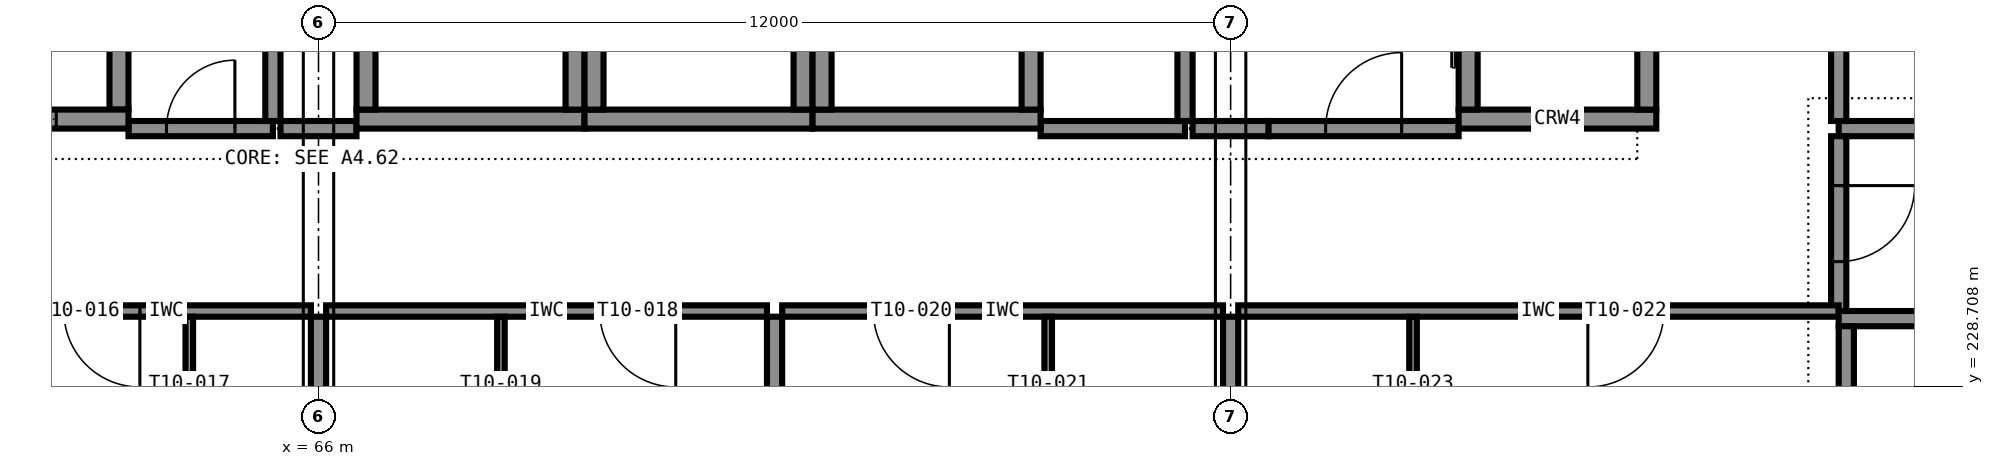
"""IFC4 building model, lengths in metres.
Left out: names, types, materials, properties, quantities, classifications, styles, units other than length and angle.
Written with IfcOpenShell. Run it as: python <this file> out.ifc"""

import sys

from ifc_helpers import new_model, si_unit, direction, frame, frame_2d, origin, place, context, subcontext, project, spatial, rectangle, extrude, element, fill, save


model = new_model("IFC4")
c1 = context("Model", 3, precision=1e-05, world=origin(), true_north=direction((0.0, 1.0)))
c2 = subcontext(c1, "Body", "Model", "MODEL_VIEW")
j1 = project(units=[si_unit("LENGTHUNIT", "METRE"), si_unit("PLANEANGLEUNIT", "RADIAN")], contexts=[c1])
p1 = place(None, origin())
s1 = spatial("IfcSite", under=j1, at=p1, CompositionType="ELEMENT")
p2 = place(p1, origin())
s2 = spatial("IfcBuilding", under=s1, at=p2, CompositionType="ELEMENT")
p3 = place(p2, frame((0.0, 0.0, 42.6)))
s3 = spatial("IfcBuildingStorey", under=s2, at=p3, CompositionType="ELEMENT", Elevation=42.6)
p4 = place(p3, frame((60.5, 232.225, 0.0), z_axis=(0.0, 0.0, 1.0), x_axis=(1.0, 0.0, 0.0)))
e1 = element("IfcWall", 1, at=p4, inside=s3, PredefinedType="SHEAR", context=c2, shape_type="SweptSolid", body=[
    extrude(rectangle(XDim=3.0, YDim=0.25, at=frame_2d((1.5, 0.0))), origin(), (0.0, 0.0, 1.0), 3.6),
])
p5 = place(p4, frame((0.95, 0.0, 0.0)))
e2 = element("IfcOpeningElement", 2, at=p5, cuts=e1, PredefinedType="OPENING", context=c2, shape_type="SweptSolid", body=[
    extrude(rectangle(XDim=1.1, YDim=2.1, at=frame_2d((0.55, 1.05))), frame((0.0, 0.135, 0.0), z_axis=(0.0, -1.0, 0.0), x_axis=(1.0, 0.0, 0.0)), (0.0, 0.0, 1.0), 0.27),
])
p6 = place(p3, frame((63.375, 232.35, 0.0), z_axis=(0.0, 0.0, 1.0), x_axis=(0.0, 1.0, 0.0)))
e3 = element("IfcWall", 3, at=p6, inside=s3, PredefinedType="SHEAR", context=c2, shape_type="SweptSolid", body=[
    extrude(rectangle(XDim=3.3, YDim=0.25, at=frame_2d((1.65, 0.0))), origin(), (0.0, 0.0, 1.0), 3.6),
])
p7 = place(p3, frame((66.5, 232.225, 0.0), z_axis=(0.0, 0.0, 1.0), x_axis=(1.0, 0.0, 0.0)))
e4 = element("IfcWall", 4, at=p7, inside=s3, PredefinedType="SHEAR", context=c2, shape_type="SweptSolid", body=[
    extrude(rectangle(XDim=3.0, YDim=0.25, at=frame_2d((1.5, 0.0))), origin(), (0.0, 0.0, 1.0), 3.6),
])
for number, where, z_axis, x_axis in (
    (5, (66.625, 232.35, 0.0), (0.0, 0.0, 1.0), (0.0, 1.0, 0.0)),
    (6, (69.375, 232.35, 0.0), (0.0, 0.0, 1.0), (0.0, 1.0, 0.0)),
):
    element("IfcWall", number, at=place(p3, frame(where, z_axis=z_axis, x_axis=x_axis)), inside=s3, PredefinedType="SHEAR", context=c2, shape_type="SweptSolid", body=[
        extrude(rectangle(XDim=3.3, YDim=0.25, at=frame_2d((1.65, 0.0))), origin(), (0.0, 0.0, 1.0), 3.6),
    ])
p8 = place(p3, frame((69.5, 232.225, 0.0), z_axis=(0.0, 0.0, 1.0), x_axis=(1.0, 0.0, 0.0)))
e7 = element("IfcWall", 7, at=p8, inside=s3, PredefinedType="SHEAR", context=c2, shape_type="SweptSolid", body=[
    extrude(rectangle(XDim=3.0, YDim=0.25, at=frame_2d((1.5, 0.0))), origin(), (0.0, 0.0, 1.0), 3.6),
])
for number, where, z_axis, x_axis in (
    (8, (69.625, 232.35, 0.0), (0.0, 0.0, 1.0), (0.0, 1.0, 0.0)),
    (9, (72.375, 232.35, 0.0), (0.0, 0.0, 1.0), (0.0, 1.0, 0.0)),
):
    element("IfcWall", number, at=place(p3, frame(where, z_axis=z_axis, x_axis=x_axis)), inside=s3, PredefinedType="SHEAR", context=c2, shape_type="SweptSolid", body=[
        extrude(rectangle(XDim=3.3, YDim=0.25, at=frame_2d((1.65, 0.0))), origin(), (0.0, 0.0, 1.0), 3.6),
    ])
p9 = place(p3, frame((72.5, 232.225, 0.0), z_axis=(0.0, 0.0, 1.0), x_axis=(1.0, 0.0, 0.0)))
e10 = element("IfcWall", 10, at=p9, inside=s3, PredefinedType="SHEAR", context=c2, shape_type="SweptSolid", body=[
    extrude(rectangle(XDim=3.0, YDim=0.25, at=frame_2d((1.5, 0.0))), origin(), (0.0, 0.0, 1.0), 3.6),
])
for number, where, z_axis, x_axis in (
    (11, (72.625, 232.35, 0.0), (0.0, 0.0, 1.0), (0.0, 1.0, 0.0)),
    (12, (75.375, 232.35, 0.0), (0.0, 0.0, 1.0), (0.0, 1.0, 0.0)),
):
    element("IfcWall", number, at=place(p3, frame(where, z_axis=z_axis, x_axis=x_axis)), inside=s3, PredefinedType="SHEAR", context=c2, shape_type="SweptSolid", body=[
        extrude(rectangle(XDim=3.3, YDim=0.25, at=frame_2d((1.65, 0.0))), origin(), (0.0, 0.0, 1.0), 3.6),
    ])
p10 = place(p3, frame((81.0, 232.225, 0.0), z_axis=(0.0, 0.0, 1.0), x_axis=(1.0, 0.0, 0.0)))
e13 = element("IfcWall", 13, at=p10, inside=s3, PredefinedType="SHEAR", context=c2, shape_type="SweptSolid", body=[
    extrude(rectangle(XDim=2.6, YDim=0.25, at=frame_2d((1.3, 0.0))), origin(), (0.0, 0.0, 1.0), 3.6),
])
p11 = place(p3, frame((81.125, 232.35, 0.0), z_axis=(0.0, 0.0, 1.0), x_axis=(0.0, 1.0, 0.0)))
e14 = element("IfcWall", 14, at=p11, inside=s3, PredefinedType="SHEAR", context=c2, shape_type="SweptSolid", body=[
    extrude(rectangle(XDim=3.3, YDim=0.25, at=frame_2d((1.65, 0.0))), origin(), (0.0, 0.0, 1.0), 3.6),
])
p12 = place(p11, frame((1.1, 0.0, 0.0)))
e15 = element("IfcOpeningElement", 15, at=p12, cuts=e14, PredefinedType="OPENING", context=c2, shape_type="SweptSolid", body=[
    extrude(rectangle(XDim=1.1, YDim=2.1, at=frame_2d((0.55, 1.05))), frame((0.0, 0.135, 0.0), z_axis=(0.0, -1.0, 0.0), x_axis=(1.0, 0.0, 0.0)), (0.0, 0.0, 1.0), 0.27),
])
p13 = place(p3, frame((83.475, 232.35, 0.0), z_axis=(0.0, 0.0, 1.0), x_axis=(0.0, 1.0, 0.0)))
e16 = element("IfcWall", 16, at=p13, inside=s3, PredefinedType="SHEAR", context=c2, shape_type="SweptSolid", body=[
    extrude(rectangle(XDim=3.3, YDim=0.25, at=frame_2d((1.65, 0.0))), origin(), (0.0, 0.0, 1.0), 3.6),
])
p14 = place(p3, frame((89.5, 229.6, 0.0), z_axis=(0.0, 0.0, 1.0), x_axis=(-1.0, 0.0, 0.0)))
e17 = element("IfcWall", 17, at=p14, inside=s3, PredefinedType="SHEAR", context=c2, shape_type="SweptSolid", body=[
    extrude(rectangle(XDim=3.5, YDim=0.2, at=frame_2d((1.75, 0.0))), origin(), (0.0, 0.0, 1.0), 3.6),
])
p15 = place(p14, frame((1.15, 0.0, 0.0)))
e18 = element("IfcOpeningElement", 18, at=p15, cuts=e17, PredefinedType="OPENING", context=c2, shape_type="SweptSolid", body=[
    extrude(rectangle(XDim=1.2, YDim=2.1, at=frame_2d((0.6, 1.05))), frame((0.0, 0.11, 0.0), z_axis=(0.0, -1.0, 0.0), x_axis=(1.0, 0.0, 0.0)), (0.0, 0.0, 1.0), 0.22),
])
p16 = place(p3, frame((86.1, 222.0, 0.0), z_axis=(0.0, 0.0, 1.0), x_axis=(0.0, 1.0, 0.0)))
e19 = element("IfcWall", 19, at=p16, inside=s3, PredefinedType="SHEAR", context=c2, shape_type="SweptSolid", body=[
    extrude(rectangle(XDim=7.5, YDim=0.2, at=frame_2d((3.75, 0.0))), origin(), (0.0, 0.0, 1.0), 3.6),
])
p17 = place(p3, frame((63.5, 232.1, 0.0), z_axis=(0.0, 0.0, 1.0), x_axis=(1.0, 0.0, 0.0)))
e20 = element("IfcWall", 20, at=p17, inside=s3, PredefinedType="PARTITIONING", context=c2, shape_type="SweptSolid", body=[
    extrude(rectangle(XDim=1.9, YDim=0.2, at=frame_2d((0.95, 0.0))), origin(), (0.0, 0.0, 1.0), 3.4),
])
p18 = place(p17, frame((0.5, 0.0, 0.0)))
e21 = element("IfcOpeningElement", 21, at=p18, cuts=e20, PredefinedType="OPENING", context=c2, shape_type="SweptSolid", body=[
    extrude(rectangle(XDim=0.9, YDim=2.1, at=frame_2d((0.45, 1.05))), frame((0.0, 0.11, 0.0), z_axis=(0.0, -1.0, 0.0), x_axis=(1.0, 0.0, 0.0)), (0.0, 0.0, 1.0), 0.22),
])
p19 = place(p3, frame((65.5, 232.1, 0.0), z_axis=(0.0, 0.0, 1.0), x_axis=(1.0, 0.0, 0.0)))
e22 = element("IfcWall", 22, at=p19, inside=s3, PredefinedType="PARTITIONING", context=c2, shape_type="SweptSolid", body=[
    extrude(rectangle(XDim=1.0, YDim=0.2, at=frame_2d((0.5, 0.0))), origin(), (0.0, 0.0, 1.0), 3.4),
])
p20 = place(p3, frame((75.5, 232.1, 0.0), z_axis=(0.0, 0.0, 1.0), x_axis=(1.0, 0.0, 0.0)))
e23 = element("IfcWall", 23, at=p20, inside=s3, PredefinedType="PARTITIONING", context=c2, shape_type="SweptSolid", body=[
    extrude(rectangle(XDim=1.9, YDim=0.2, at=frame_2d((0.95, 0.0))), origin(), (0.0, 0.0, 1.0), 3.4),
])
p21 = place(p3, frame((77.5, 232.1, 0.0), z_axis=(0.0, 0.0, 1.0), x_axis=(1.0, 0.0, 0.0)))
e24 = element("IfcWall", 24, at=p21, inside=s3, PredefinedType="PARTITIONING", context=c2, shape_type="SweptSolid", body=[
    extrude(rectangle(XDim=1.0, YDim=0.2, at=frame_2d((0.5, 0.0))), origin(), (0.0, 0.0, 1.0), 3.4),
])
p22 = place(p3, frame((78.5, 232.1, 0.0), z_axis=(0.0, 0.0, 1.0), x_axis=(1.0, 0.0, 0.0)))
e25 = element("IfcWall", 25, at=p22, inside=s3, PredefinedType="PARTITIONING", context=c2, shape_type="SweptSolid", body=[
    extrude(rectangle(XDim=2.5, YDim=0.2, at=frame_2d((1.25, 0.0))), origin(), (0.0, 0.0, 1.0), 3.4),
])
p23 = place(p22, frame((0.75, 0.0, 0.0)))
e26 = element("IfcOpeningElement", 26, at=p23, cuts=e25, PredefinedType="OPENING", context=c2, shape_type="SweptSolid", body=[
    extrude(rectangle(XDim=1.0, YDim=2.1, at=frame_2d((0.5, 1.05))), frame((0.0, 0.11, 0.0), z_axis=(0.0, -1.0, 0.0), x_axis=(1.0, 0.0, 0.0)), (0.0, 0.0, 1.0), 0.22),
])
p24 = place(p3, frame((86.0, 232.1, 0.0), z_axis=(0.0, 0.0, 1.0), x_axis=(1.0, 0.0, 0.0)))
e27 = element("IfcWall", 27, at=p24, inside=s3, PredefinedType="PARTITIONING", context=c2, shape_type="SweptSolid", body=[
    extrude(rectangle(XDim=3.7, YDim=0.2, at=frame_2d((1.85, 0.0))), origin(), (0.0, 0.0, 1.0), 3.4),
])
for number, where, z_axis, x_axis in (
    (28, (65.4, 232.2, 0.0), (0.0, 0.0, 1.0), (0.0, 1.0, 0.0)),
    (29, (77.4, 232.2, 0.0), (0.0, 0.0, 1.0), (0.0, 1.0, 0.0)),
):
    element("IfcWall", number, at=place(p3, frame(where, z_axis=z_axis, x_axis=x_axis)), inside=s3, PredefinedType="PARTITIONING", context=c2, shape_type="SweptSolid", body=[
        extrude(rectangle(XDim=3.6, YDim=0.2, at=frame_2d((1.8, 0.0))), origin(), (0.0, 0.0, 1.0), 3.4),
    ])
p25 = place(p3, frame((86.0, 235.8, 0.0), z_axis=(0.0, 0.0, 1.0), x_axis=(0.0, -1.0, 0.0)))
e30 = element("IfcWall", 30, at=p25, inside=s3, PredefinedType="PARTITIONING", context=c2, shape_type="SweptSolid", body=[
    extrude(rectangle(XDim=3.6, YDim=0.2, at=frame_2d((1.8, 0.0))), origin(), (0.0, 0.0, 1.0), 3.4),
])
p26 = place(p25, frame((1.35, 0.0, 0.0)))
e31 = element("IfcOpeningElement", 31, at=p26, cuts=e30, PredefinedType="OPENING", context=c2, shape_type="SweptSolid", body=[
    extrude(rectangle(XDim=0.9, YDim=2.1, at=frame_2d((0.45, 1.05))), frame((0.0, 0.11, 0.0), z_axis=(0.0, -1.0, 0.0), x_axis=(1.0, 0.0, 0.0)), (0.0, 0.0, 1.0), 0.22),
])
p27 = place(p3, frame((86.0, 232.0, 0.0), z_axis=(0.0, 0.0, 1.0), x_axis=(0.0, -1.0, 0.0)))
e32 = element("IfcWall", 32, at=p27, inside=s3, PredefinedType="PARTITIONING", context=c2, shape_type="SweptSolid", body=[
    extrude(rectangle(XDim=2.3, YDim=0.2, at=frame_2d((1.15, 0.0))), origin(), (0.0, 0.0, 1.0), 3.4),
])
p28 = place(p27, frame((0.65, 0.0, 0.0)))
e33 = element("IfcOpeningElement", 33, at=p28, cuts=e32, PredefinedType="OPENING", context=c2, shape_type="SweptSolid", body=[
    extrude(rectangle(XDim=1.0, YDim=2.1, at=frame_2d((0.5, 1.05))), frame((0.0, 0.11, 0.0), z_axis=(0.0, -1.0, 0.0), x_axis=(1.0, 0.0, 0.0)), (0.0, 0.0, 1.0), 0.22),
])
p29 = place(p3, frame((65.9, 229.7, 0.0), z_axis=(0.0, 0.0, 1.0), x_axis=(-1.0, 0.0, 0.0)))
e34 = element("IfcWall", 34, at=p29, inside=s3, PredefinedType="PARTITIONING", context=c2, shape_type="SweptSolid", body=[
    extrude(rectangle(XDim=3.8, YDim=0.15, at=frame_2d((1.9, 0.0))), origin(), (0.0, 0.0, 1.0), 3.4),
])
p30 = place(p29, frame((2.25, 0.0, 0.0)))
e35 = element("IfcOpeningElement", 35, at=p30, cuts=e34, PredefinedType="OPENING", context=c2, shape_type="SweptSolid", body=[
    extrude(rectangle(XDim=1.0, YDim=2.1, at=frame_2d((0.5, 1.05))), frame((0.0, 0.085, 0.0), z_axis=(0.0, -1.0, 0.0), x_axis=(1.0, 0.0, 0.0)), (0.0, 0.0, 1.0), 0.17),
])
p31 = place(p3, frame((64.3, 226.75, 0.0), z_axis=(0.0, 0.0, 1.0), x_axis=(0.0, 1.0, 0.0)))
e36 = element("IfcWall", 36, at=p31, inside=s3, PredefinedType="PARTITIONING", context=c2, shape_type="SweptSolid", body=[
    extrude(rectangle(XDim=2.875, YDim=0.1, at=frame_2d((1.438, 0.0))), origin(), (0.0, 0.0, 1.0), 3.4),
])
p32 = place(p31, frame((1.038, 0.0, 0.0)))
e37 = element("IfcOpeningElement", 37, at=p32, cuts=e36, PredefinedType="OPENING", context=c2, shape_type="SweptSolid", body=[
    extrude(rectangle(XDim=0.8, YDim=2.1, at=frame_2d((0.4, 1.05))), frame((0.0, 0.06, 0.0), z_axis=(0.0, -1.0, 0.0), x_axis=(1.0, 0.0, 0.0)), (0.0, 0.0, 1.0), 0.12),
])
p33 = place(p3, frame((71.9, 229.7, 0.0), z_axis=(0.0, 0.0, 1.0), x_axis=(-1.0, 0.0, 0.0)))
e38 = element("IfcWall", 38, at=p33, inside=s3, PredefinedType="PARTITIONING", context=c2, shape_type="SweptSolid", body=[
    extrude(rectangle(XDim=5.8, YDim=0.15, at=frame_2d((2.9, 0.0))), origin(), (0.0, 0.0, 1.0), 3.4),
])
p34 = place(p33, frame((1.2, 0.0, 0.0)))
e39 = element("IfcOpeningElement", 39, at=p34, cuts=e38, PredefinedType="OPENING", context=c2, shape_type="SweptSolid", body=[
    extrude(rectangle(XDim=1.0, YDim=2.1, at=frame_2d((0.5, 1.05))), frame((0.0, 0.085, 0.0), z_axis=(0.0, -1.0, 0.0), x_axis=(1.0, 0.0, 0.0)), (0.0, 0.0, 1.0), 0.17),
])
p35 = place(p3, frame((68.4, 229.625, 0.0), z_axis=(0.0, 0.0, 1.0), x_axis=(0.0, -1.0, 0.0)))
e40 = element("IfcWall", 40, at=p35, inside=s3, PredefinedType="PARTITIONING", context=c2, shape_type="SweptSolid", body=[
    extrude(rectangle(XDim=2.875, YDim=0.1, at=frame_2d((1.438, 0.0))), origin(), (0.0, 0.0, 1.0), 3.4),
])
p36 = place(p35, frame((1.038, 0.0, 0.0)))
e41 = element("IfcOpeningElement", 41, at=p36, cuts=e40, PredefinedType="OPENING", context=c2, shape_type="SweptSolid", body=[
    extrude(rectangle(XDim=0.8, YDim=2.1, at=frame_2d((0.4, 1.05))), frame((0.0, 0.06, 0.0), z_axis=(0.0, -1.0, 0.0), x_axis=(1.0, 0.0, 0.0)), (0.0, 0.0, 1.0), 0.12),
])
p37 = place(p3, frame((77.9, 229.7, 0.0), z_axis=(0.0, 0.0, 1.0), x_axis=(-1.0, 0.0, 0.0)))
e42 = element("IfcWall", 42, at=p37, inside=s3, PredefinedType="PARTITIONING", context=c2, shape_type="SweptSolid", body=[
    extrude(rectangle(XDim=5.8, YDim=0.15, at=frame_2d((2.9, 0.0))), origin(), (0.0, 0.0, 1.0), 3.4),
])
p38 = place(p37, frame((3.6, 0.0, 0.0)))
e43 = element("IfcOpeningElement", 43, at=p38, cuts=e42, PredefinedType="OPENING", context=c2, shape_type="SweptSolid", body=[
    extrude(rectangle(XDim=1.0, YDim=2.1, at=frame_2d((0.5, 1.05))), frame((0.0, 0.085, 0.0), z_axis=(0.0, -1.0, 0.0), x_axis=(1.0, 0.0, 0.0)), (0.0, 0.0, 1.0), 0.17),
])
p39 = place(p3, frame((75.6, 226.75, 0.0), z_axis=(0.0, 0.0, 1.0), x_axis=(0.0, 1.0, 0.0)))
e44 = element("IfcWall", 44, at=p39, inside=s3, PredefinedType="PARTITIONING", context=c2, shape_type="SweptSolid", body=[
    extrude(rectangle(XDim=2.875, YDim=0.1, at=frame_2d((1.438, 0.0))), origin(), (0.0, 0.0, 1.0), 3.4),
])
p40 = place(p39, frame((1.038, 0.0, 0.0)))
e45 = element("IfcOpeningElement", 45, at=p40, cuts=e44, PredefinedType="OPENING", context=c2, shape_type="SweptSolid", body=[
    extrude(rectangle(XDim=0.8, YDim=2.1, at=frame_2d((0.4, 1.05))), frame((0.0, 0.06, 0.0), z_axis=(0.0, -1.0, 0.0), x_axis=(1.0, 0.0, 0.0)), (0.0, 0.0, 1.0), 0.12),
])
p41 = place(p3, frame((86.0, 229.7, 0.0), z_axis=(0.0, 0.0, 1.0), x_axis=(-1.0, 0.0, 0.0)))
e46 = element("IfcWall", 46, at=p41, inside=s3, PredefinedType="PARTITIONING", context=c2, shape_type="SweptSolid", body=[
    extrude(rectangle(XDim=7.9, YDim=0.15, at=frame_2d((3.95, 0.0))), origin(), (0.0, 0.0, 1.0), 3.4),
])
p42 = place(p41, frame((2.3, 0.0, 0.0)))
e47 = element("IfcOpeningElement", 47, at=p42, cuts=e46, PredefinedType="OPENING", context=c2, shape_type="SweptSolid", body=[
    extrude(rectangle(XDim=1.0, YDim=2.1, at=frame_2d((0.5, 1.05))), frame((0.0, 0.085, 0.0), z_axis=(0.0, -1.0, 0.0), x_axis=(1.0, 0.0, 0.0)), (0.0, 0.0, 1.0), 0.17),
])
p43 = place(p3, frame((80.4, 229.625, 0.0), z_axis=(0.0, 0.0, 1.0), x_axis=(0.0, -1.0, 0.0)))
e48 = element("IfcWall", 48, at=p43, inside=s3, PredefinedType="PARTITIONING", context=c2, shape_type="SweptSolid", body=[
    extrude(rectangle(XDim=2.875, YDim=0.1, at=frame_2d((1.438, 0.0))), origin(), (0.0, 0.0, 1.0), 3.4),
])
p44 = place(p43, frame((1.038, 0.0, 0.0)))
e49 = element("IfcOpeningElement", 49, at=p44, cuts=e48, PredefinedType="OPENING", context=c2, shape_type="SweptSolid", body=[
    extrude(rectangle(XDim=0.8, YDim=2.1, at=frame_2d((0.4, 1.05))), frame((0.0, 0.06, 0.0), z_axis=(0.0, -1.0, 0.0), x_axis=(1.0, 0.0, 0.0)), (0.0, 0.0, 1.0), 0.12),
])
p45 = place(p3, frame((66.0, 222.4, 0.0), z_axis=(0.0, 0.0, 1.0), x_axis=(0.0, 1.0, 0.0)))
e50 = element("IfcWall", 50, at=p45, inside=s3, PredefinedType="PARTITIONING", context=c2, shape_type="SweptSolid", body=[
    extrude(rectangle(XDim=7.225, YDim=0.2, at=frame_2d((3.613, 0.0))), origin(), (0.0, 0.0, 1.0), 2.6),
])
p46 = place(p3, frame((72.0, 222.3, 0.0), z_axis=(0.0, 0.0, 1.0), x_axis=(0.0, 1.0, 0.0)))
e51 = element("IfcWall", 51, at=p46, inside=s3, PredefinedType="PARTITIONING", context=c2, shape_type="SweptSolid", body=[
    extrude(rectangle(XDim=7.325, YDim=0.2, at=frame_2d((3.663, 0.0))), origin(), (0.0, 0.0, 1.0), 3.4),
])
p47 = place(p3, frame((78.0, 222.4, 0.0), z_axis=(0.0, 0.0, 1.0), x_axis=(0.0, 1.0, 0.0)))
e52 = element("IfcWall", 52, at=p47, inside=s3, PredefinedType="PARTITIONING", context=c2, shape_type="SweptSolid", body=[
    extrude(rectangle(XDim=7.225, YDim=0.2, at=frame_2d((3.613, 0.0))), origin(), (0.0, 0.0, 1.0), 2.6),
])
p48 = place(p18, origin())
e53 = element("IfcDoor", 53, at=p48, inside=s3, OperationType="SINGLE_SWING_RIGHT", PredefinedType="DOOR", context=c2, shape_type="SweptSolid", body=[
    extrude(rectangle(XDim=0.9, YDim=2.1, at=frame_2d((0.45, 1.05))), frame((0.0, 0.025, 0.0), z_axis=(0.0, -1.0, 0.0), x_axis=(1.0, 0.0, 0.0)), (0.0, 0.0, 1.0), 0.05),
])
fill(e21, e53)
p49 = place(p23, origin())
e54 = element("IfcDoor", 54, at=p49, inside=s3, OperationType="SINGLE_SWING_RIGHT", PredefinedType="DOOR", context=c2, shape_type="SweptSolid", body=[
    extrude(rectangle(XDim=1.0, YDim=2.1, at=frame_2d((0.5, 1.05))), frame((0.0, 0.025, 0.0), z_axis=(0.0, -1.0, 0.0), x_axis=(1.0, 0.0, 0.0)), (0.0, 0.0, 1.0), 0.05),
])
fill(e26, e54)
p50 = place(p28, origin())
e55 = element("IfcDoor", 55, at=p50, inside=s3, OperationType="SINGLE_SWING_LEFT", PredefinedType="DOOR", context=c2, shape_type="SweptSolid", body=[
    extrude(rectangle(XDim=1.0, YDim=2.1, at=frame_2d((0.5, 1.05))), frame((0.0, 0.025, 0.0), z_axis=(0.0, -1.0, 0.0), x_axis=(1.0, 0.0, 0.0)), (0.0, 0.0, 1.0), 0.05),
])
fill(e33, e55)
p51 = place(p30, origin())
e56 = element("IfcDoor", 56, at=p51, inside=s3, OperationType="SINGLE_SWING_LEFT", PredefinedType="DOOR", context=c2, shape_type="SweptSolid", body=[
    extrude(rectangle(XDim=1.0, YDim=2.1, at=frame_2d((0.5, 1.05))), frame((0.0, 0.025, 0.0), z_axis=(0.0, -1.0, 0.0), x_axis=(1.0, 0.0, 0.0)), (0.0, 0.0, 1.0), 0.05),
])
fill(e35, e56)
p52 = place(p34, origin())
e57 = element("IfcDoor", 57, at=p52, inside=s3, OperationType="SINGLE_SWING_LEFT", PredefinedType="DOOR", context=c2, shape_type="SweptSolid", body=[
    extrude(rectangle(XDim=1.0, YDim=2.1, at=frame_2d((0.5, 1.05))), frame((0.0, 0.025, 0.0), z_axis=(0.0, -1.0, 0.0), x_axis=(1.0, 0.0, 0.0)), (0.0, 0.0, 1.0), 0.05),
])
fill(e39, e57)
p53 = place(p38, origin())
e58 = element("IfcDoor", 58, at=p53, inside=s3, OperationType="SINGLE_SWING_LEFT", PredefinedType="DOOR", context=c2, shape_type="SweptSolid", body=[
    extrude(rectangle(XDim=1.0, YDim=2.1, at=frame_2d((0.5, 1.05))), frame((0.0, 0.025, 0.0), z_axis=(0.0, -1.0, 0.0), x_axis=(1.0, 0.0, 0.0)), (0.0, 0.0, 1.0), 0.05),
])
fill(e43, e58)
p54 = place(p42, origin())
e59 = element("IfcDoor", 59, at=p54, inside=s3, OperationType="SINGLE_SWING_RIGHT", PredefinedType="DOOR", context=c2, shape_type="SweptSolid", body=[
    extrude(rectangle(XDim=1.0, YDim=2.1, at=frame_2d((0.5, 1.05))), frame((0.0, 0.025, 0.0), z_axis=(0.0, -1.0, 0.0), x_axis=(1.0, 0.0, 0.0)), (0.0, 0.0, 1.0), 0.05),
])
fill(e47, e59)
p55 = place(p5, origin())
e60 = element("IfcDoor", 60, at=p55, inside=s3, OperationType="SLIDING_TO_LEFT", PredefinedType="DOOR", context=c2, shape_type="SweptSolid", body=[
    extrude(rectangle(XDim=1.1, YDim=2.1, at=frame_2d((0.55, 1.05))), frame((0.0, 0.025, 0.0), z_axis=(0.0, -1.0, 0.0), x_axis=(1.0, 0.0, 0.0)), (0.0, 0.0, 1.0), 0.05),
])
fill(e2, e60)
save(model, sys.argv[1])
